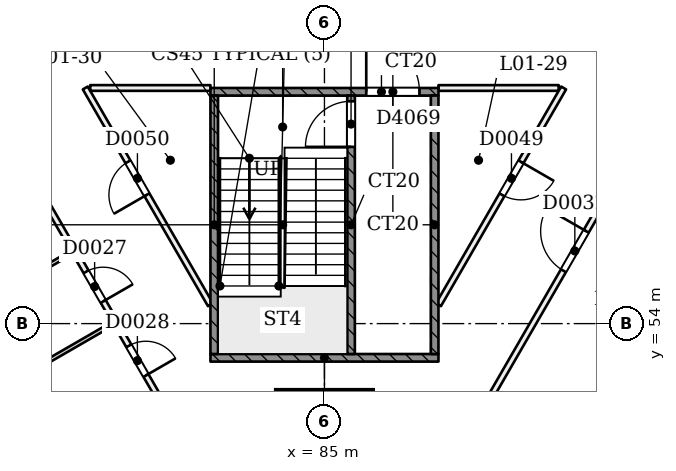
"""IFC4 building model, lengths in metres.
Left out: names, types, materials, properties, quantities, classifications, styles, units other than length and angle.
Written with IfcOpenShell. Run it as: python <this file> out.ifc"""

import sys

from ifc_helpers import new_model, si_unit, direction, frame, frame_2d, origin, origin_2d, place, context, subcontext, project, spatial, rectangle, extrude, element, fill, save


model = new_model("IFC4")
c1 = context("Model", 3, precision=1e-05, world=origin(), true_north=direction((0.0, 1.0)))
c2 = subcontext(c1, "Body", "Model", "MODEL_VIEW")
j1 = project(units=[si_unit("LENGTHUNIT", "METRE"), si_unit("PLANEANGLEUNIT", "RADIAN")], contexts=[c1])
p1 = place(None, origin())
s1 = spatial("IfcSite", under=j1, at=p1, CompositionType="ELEMENT")
p2 = place(p1, origin())
s2 = spatial("IfcBuilding", under=s1, at=p2, CompositionType="ELEMENT")
p3 = place(p2, frame((0.0, 0.0, 9.0)))
s3 = spatial("IfcBuildingStorey", under=s2, at=p3, CompositionType="ELEMENT", Elevation=9.0)
p4 = place(p3, frame((85.0, 50.908, 0.0), z_axis=(0.0, 0.058331497301, 0.998297268564), x_axis=(-1.0, 0.0, 0.0)))
e1 = element("IfcColumn", 1, at=p4, inside=s3, PredefinedType="COLUMN", context=c2, shape_type="SweptSolid", body=[
    extrude(rectangle(XDim=2.52, YDim=2.52, at=origin_2d()), origin(), (0.0, 0.0, 1.0), 4.508),
])
p5 = place(p3, frame((55.57, 95.474, 0.0), z_axis=(0.0, 0.0, 1.0), x_axis=(0.500000085768, -0.866025354266, 0.0)))
e2 = element("IfcWall", 2, at=p5, inside=s3, PredefinedType="PARTITIONING", context=c2, shape_type="SweptSolid", body=[
    extrude(rectangle(XDim=55.365, YDim=0.15, at=frame_2d((27.682, 0.0))), origin(), (0.0, 0.0, 1.0), 4.05),
])
p6 = place(p5, frame((6.832, 0.0, 0.0)))
e3 = element("IfcOpeningElement", 3, at=p6, cuts=e2, PredefinedType="OPENING", context=c2, shape_type="SweptSolid", body=[
    extrude(rectangle(XDim=1.2, YDim=2.1, at=frame_2d((0.6, 1.05))), frame((0.0, 0.085, 0.0), z_axis=(0.0, -1.0, 0.0), x_axis=(1.0, 0.0, 0.0)), (0.0, 0.0, 1.0), 0.171),
])
p7 = place(p5, frame((18.182, 0.0, 0.0)))
e4 = element("IfcOpeningElement", 4, at=p7, cuts=e2, PredefinedType="OPENING", context=c2, shape_type="SweptSolid", body=[
    extrude(rectangle(XDim=1.0, YDim=2.1, at=frame_2d((0.5, 1.05))), frame((0.0, 0.085, 0.0), z_axis=(0.0, -1.0, 0.0), x_axis=(1.0, 0.0, 0.0)), (0.0, 0.0, 1.0), 0.171),
])
p8 = place(p5, frame((30.132, 0.0, 0.0)))
e5 = element("IfcOpeningElement", 5, at=p8, cuts=e2, PredefinedType="OPENING", context=c2, shape_type="SweptSolid", body=[
    extrude(rectangle(XDim=1.2, YDim=2.1, at=frame_2d((0.6, 1.05))), frame((0.0, 0.085, 0.0), z_axis=(0.0, -1.0, 0.0), x_axis=(1.0, 0.0, 0.0)), (0.0, 0.0, 1.0), 0.171),
])
p9 = place(p5, frame((40.582, 0.0, 0.0)))
e6 = element("IfcOpeningElement", 6, at=p9, cuts=e2, PredefinedType="OPENING", context=c2, shape_type="SweptSolid", body=[
    extrude(rectangle(XDim=1.2, YDim=2.1, at=frame_2d((0.6, 1.05))), frame((0.0, 0.085, 0.0), z_axis=(0.0, -1.0, 0.0), x_axis=(1.0, 0.0, 0.0)), (0.0, 0.0, 1.0), 0.171),
])
p10 = place(p5, frame((46.315, 0.0, 0.0)))
e7 = element("IfcOpeningElement", 7, at=p10, cuts=e2, PredefinedType="OPENING", context=c2, shape_type="SweptSolid", body=[
    extrude(rectangle(XDim=0.9, YDim=2.1, at=frame_2d((0.45, 1.05))), frame((0.0, 0.085, 0.0), z_axis=(0.0, -1.0, 0.0), x_axis=(1.0, 0.0, 0.0)), (0.0, 0.0, 1.0), 0.171),
])
p11 = place(p5, frame((48.565, 0.0, 0.0)))
e8 = element("IfcOpeningElement", 8, at=p11, cuts=e2, PredefinedType="OPENING", context=c2, shape_type="SweptSolid", body=[
    extrude(rectangle(XDim=0.9, YDim=2.1, at=frame_2d((0.45, 1.05))), frame((0.0, 0.085, 0.0), z_axis=(0.0, -1.0, 0.0), x_axis=(1.0, 0.0, 0.0)), (0.0, 0.0, 1.0), 0.171),
])
p12 = place(p5, frame((53.195, 0.0, 0.0)))
e9 = element("IfcOpeningElement", 9, at=p12, cuts=e2, PredefinedType="OPENING", context=c2, shape_type="SweptSolid", body=[
    extrude(rectangle(XDim=1.2, YDim=2.1, at=frame_2d((0.6, 1.05))), frame((0.0, 0.085, 0.0), z_axis=(0.0, -1.0, 0.0), x_axis=(1.0, 0.0, 0.0)), (0.0, 0.0, 1.0), 0.171),
])
p13 = place(p3, frame((86.747, 47.526, 0.0), z_axis=(0.0, 0.0, 1.0), x_axis=(0.500000085768, 0.866025354266, 0.0)))
e10 = element("IfcWall", 10, at=p13, inside=s3, PredefinedType="PARTITIONING", context=c2, shape_type="SweptSolid", body=[
    extrude(rectangle(XDim=55.365, YDim=0.15, at=frame_2d((27.682, 0.0))), origin(), (0.0, 0.0, 1.0), 4.05),
])
p14 = place(p13, frame((0.97, 0.0, 0.0)))
e11 = element("IfcOpeningElement", 11, at=p14, cuts=e10, PredefinedType="OPENING", context=c2, shape_type="SweptSolid", body=[
    extrude(rectangle(XDim=1.2, YDim=2.1, at=frame_2d((0.6, 1.05))), frame((0.0, 0.085, 0.0), z_axis=(0.0, -1.0, 0.0), x_axis=(1.0, 0.0, 0.0)), (0.0, 0.0, 1.0), 0.171),
])
p15 = place(p13, frame((9.082, 0.0, 0.0)))
e12 = element("IfcOpeningElement", 12, at=p15, cuts=e10, PredefinedType="OPENING", context=c2, shape_type="SweptSolid", body=[
    extrude(rectangle(XDim=1.2, YDim=2.1, at=frame_2d((0.6, 1.05))), frame((0.0, 0.085, 0.0), z_axis=(0.0, -1.0, 0.0), x_axis=(1.0, 0.0, 0.0)), (0.0, 0.0, 1.0), 0.171),
])
p16 = place(p13, frame((18.082, 0.0, 0.0)))
e13 = element("IfcOpeningElement", 13, at=p16, cuts=e10, PredefinedType="OPENING", context=c2, shape_type="SweptSolid", body=[
    extrude(rectangle(XDim=1.2, YDim=2.1, at=frame_2d((0.6, 1.05))), frame((0.0, 0.085, 0.0), z_axis=(0.0, -1.0, 0.0), x_axis=(1.0, 0.0, 0.0)), (0.0, 0.0, 1.0), 0.171),
])
p17 = place(p13, frame((23.613, 0.0, 0.0)))
e14 = element("IfcOpeningElement", 14, at=p17, cuts=e10, PredefinedType="OPENING", context=c2, shape_type="SweptSolid", body=[
    extrude(rectangle(XDim=1.0, YDim=2.1, at=frame_2d((0.5, 1.05))), frame((0.0, 0.085, 0.0), z_axis=(0.0, -1.0, 0.0), x_axis=(1.0, 0.0, 0.0)), (0.0, 0.0, 1.0), 0.171),
])
p18 = place(p13, frame((26.363, 0.0, 0.0)))
e15 = element("IfcOpeningElement", 15, at=p18, cuts=e10, PredefinedType="OPENING", context=c2, shape_type="SweptSolid", body=[
    extrude(rectangle(XDim=1.0, YDim=2.1, at=frame_2d((0.5, 1.05))), frame((0.0, 0.085, 0.0), z_axis=(0.0, -1.0, 0.0), x_axis=(1.0, 0.0, 0.0)), (0.0, 0.0, 1.0), 0.171),
])
p19 = place(p13, frame((33.032, 0.0, 0.0)))
e16 = element("IfcOpeningElement", 16, at=p19, cuts=e10, PredefinedType="OPENING", context=c2, shape_type="SweptSolid", body=[
    extrude(rectangle(XDim=1.2, YDim=2.1, at=frame_2d((0.6, 1.05))), frame((0.0, 0.085, 0.0), z_axis=(0.0, -1.0, 0.0), x_axis=(1.0, 0.0, 0.0)), (0.0, 0.0, 1.0), 0.171),
])
p20 = place(p13, frame((47.337, 0.0, 0.0)))
e17 = element("IfcOpeningElement", 17, at=p20, cuts=e10, PredefinedType="OPENING", context=c2, shape_type="SweptSolid", body=[
    extrude(rectangle(XDim=1.2, YDim=2.1, at=frame_2d((0.6, 1.05))), frame((0.0, 0.085, 0.0), z_axis=(0.0, -1.0, 0.0), x_axis=(1.0, 0.0, 0.0)), (0.0, 0.0, 1.0), 0.171),
])
p21 = place(p3, frame((88.0, 60.199, 0.0), z_axis=(0.0, 0.0, 1.0), x_axis=(0.999999952341, 0.00030873725, 0.0)))
e18 = element("IfcWall", 18, at=p21, inside=s3, PredefinedType="PARTITIONING", context=c2, shape_type="SweptSolid", body=[
    extrude(rectangle(XDim=3.163, YDim=0.15, at=frame_2d((1.582, 0.0))), origin(), (0.0, 0.0, 1.0), 4.05),
])
p22 = place(p3, frame((91.293, 60.2, 0.0), z_axis=(0.0, 0.0, 1.0), x_axis=(-0.500010165703, -0.866019534533, 0.0)))
e19 = element("IfcWall", 19, at=p22, inside=s3, PredefinedType="PARTITIONING", context=c2, shape_type="SweptSolid", body=[
    extrude(rectangle(XDim=6.586, YDim=0.15, at=frame_2d((3.293, 0.0))), origin(), (0.0, 0.0, 1.0), 4.05),
])
p23 = place(p22, frame((2.245, 0.0, 0.0)))
e20 = element("IfcOpeningElement", 20, at=p23, cuts=e19, PredefinedType="OPENING", context=c2, shape_type="SweptSolid", body=[
    extrude(rectangle(XDim=1.0, YDim=2.1, at=frame_2d((0.5, 1.05))), frame((0.0, 0.085, 0.0), z_axis=(0.0, -1.0, 0.0), x_axis=(1.0, 0.0, 0.0)), (0.0, 0.0, 1.0), 0.171),
])
p24 = place(p3, frame((82.0, 54.496, 0.0), z_axis=(0.0, 0.0, 1.0), x_axis=(-0.500010165703, 0.866019534533, 0.0)))
e21 = element("IfcWall", 21, at=p24, inside=s3, PredefinedType="PARTITIONING", context=c2, shape_type="SweptSolid", body=[
    extrude(rectangle(XDim=6.586, YDim=0.15, at=frame_2d((3.293, 0.0))), origin(), (0.0, 0.0, 1.0), 4.05),
])
p25 = place(p24, frame((3.342, 0.0, 0.0)))
e22 = element("IfcOpeningElement", 22, at=p25, cuts=e21, PredefinedType="OPENING", context=c2, shape_type="SweptSolid", body=[
    extrude(rectangle(XDim=1.0, YDim=2.1, at=frame_2d((0.5, 1.05))), frame((0.0, 0.085, 0.0), z_axis=(0.0, -1.0, 0.0), x_axis=(1.0, 0.0, 0.0)), (0.0, 0.0, 1.0), 0.171),
])
p26 = place(p3, frame((78.837, 60.2, 0.0), z_axis=(0.0, 0.0, 1.0), x_axis=(0.999999952341, -0.00030873725, 0.0)))
e23 = element("IfcWall", 23, at=p26, inside=s3, PredefinedType="PARTITIONING", context=c2, shape_type="SweptSolid", body=[
    extrude(rectangle(XDim=3.163, YDim=0.15, at=frame_2d((1.582, 0.0))), origin(), (0.0, 0.0, 1.0), 4.05),
])
p27 = place(p3, frame((72.869, 52.711, 0.0), z_axis=(0.0, 0.0, 1.0), x_axis=(0.866025537322, 0.499999768706, 0.0)))
e24 = element("IfcWall", 24, at=p27, inside=s3, PredefinedType="PARTITIONING", context=c2, shape_type="SweptSolid", body=[
    extrude(rectangle(XDim=6.325, YDim=0.1, at=frame_2d((3.163, 0.0))), origin(), (0.0, 0.0, 1.0), 4.05),
])
p28 = place(p3, frame((73.952, 50.836, 0.0), z_axis=(0.0, 0.0, 1.0), x_axis=(0.866015887322, 0.500016482634, 0.0)))
e25 = element("IfcWall", 25, at=p28, inside=s3, PredefinedType="PARTITIONING", context=c2, shape_type="SweptSolid", body=[
    extrude(rectangle(XDim=6.325, YDim=0.1, at=frame_2d((3.163, 0.0))), origin(), (0.0, 0.0, 1.0), 4.05),
])
p29 = place(p3, frame((79.673, 41.126, 0.0), z_axis=(0.0, 0.0, 1.0), x_axis=(-0.499997306052, 0.866026959131, 0.0)))
e26 = element("IfcWall", 26, at=p29, inside=s3, PredefinedType="SOLIDWALL", context=c2, shape_type="SweptSolid", body=[
    extrude(rectangle(XDim=62.87, YDim=0.4, at=frame_2d((31.435, 0.0))), origin(), (0.0, 0.0, 1.0), 4.05),
])
p30 = place(p29, frame((54.986, 0.0, 0.9)))
e27 = element("IfcOpeningElement", 27, at=p30, cuts=e26, PredefinedType="OPENING", context=c2, shape_type="SweptSolid", body=[
    extrude(rectangle(XDim=2.4, YDim=1.5, at=frame_2d((1.2, 0.75))), frame((0.0, 0.21, 0.0), z_axis=(0.0, -1.0, 0.0), x_axis=(1.0, 0.0, 0.0)), (0.0, 0.0, 1.0), 0.421),
])
p31 = place(p29, frame((50.486, 0.0, 0.9)))
e28 = element("IfcOpeningElement", 28, at=p31, cuts=e26, PredefinedType="OPENING", context=c2, shape_type="SweptSolid", body=[
    extrude(rectangle(XDim=2.4, YDim=1.5, at=frame_2d((1.2, 0.75))), frame((0.0, 0.21, 0.0), z_axis=(0.0, -1.0, 0.0), x_axis=(1.0, 0.0, 0.0)), (0.0, 0.0, 1.0), 0.421),
])
p32 = place(p29, frame((45.986, 0.0, 0.9)))
e29 = element("IfcOpeningElement", 29, at=p32, cuts=e26, PredefinedType="OPENING", context=c2, shape_type="SweptSolid", body=[
    extrude(rectangle(XDim=2.4, YDim=1.5, at=frame_2d((1.2, 0.75))), frame((0.0, 0.21, 0.0), z_axis=(0.0, -1.0, 0.0), x_axis=(1.0, 0.0, 0.0)), (0.0, 0.0, 1.0), 0.421),
])
p33 = place(p29, frame((32.486, 0.0, 0.9)))
e30 = element("IfcOpeningElement", 30, at=p33, cuts=e26, PredefinedType="OPENING", context=c2, shape_type="SweptSolid", body=[
    extrude(rectangle(XDim=2.4, YDim=1.5, at=frame_2d((1.2, 0.75))), frame((0.0, 0.21, 0.0), z_axis=(0.0, -1.0, 0.0), x_axis=(1.0, 0.0, 0.0)), (0.0, 0.0, 1.0), 0.421),
])
p34 = place(p29, frame((27.986, 0.0, 0.9)))
e31 = element("IfcOpeningElement", 31, at=p34, cuts=e26, PredefinedType="OPENING", context=c2, shape_type="SweptSolid", body=[
    extrude(rectangle(XDim=2.4, YDim=1.5, at=frame_2d((1.2, 0.75))), frame((0.0, 0.21, 0.0), z_axis=(0.0, -1.0, 0.0), x_axis=(1.0, 0.0, 0.0)), (0.0, 0.0, 1.0), 0.421),
])
p35 = place(p29, frame((23.486, 0.0, 0.9)))
e32 = element("IfcOpeningElement", 32, at=p35, cuts=e26, PredefinedType="OPENING", context=c2, shape_type="SweptSolid", body=[
    extrude(rectangle(XDim=2.4, YDim=1.5, at=frame_2d((1.2, 0.75))), frame((0.0, 0.21, 0.0), z_axis=(0.0, -1.0, 0.0), x_axis=(1.0, 0.0, 0.0)), (0.0, 0.0, 1.0), 0.421),
])
p36 = place(p29, frame((18.986, 0.0, 0.9)))
e33 = element("IfcOpeningElement", 33, at=p36, cuts=e26, PredefinedType="OPENING", context=c2, shape_type="SweptSolid", body=[
    extrude(rectangle(XDim=2.4, YDim=1.5, at=frame_2d((1.2, 0.75))), frame((0.0, 0.21, 0.0), z_axis=(0.0, -1.0, 0.0), x_axis=(1.0, 0.0, 0.0)), (0.0, 0.0, 1.0), 0.421),
])
p37 = place(p29, frame((14.486, 0.0, 0.9)))
e34 = element("IfcOpeningElement", 34, at=p37, cuts=e26, PredefinedType="OPENING", context=c2, shape_type="SweptSolid", body=[
    extrude(rectangle(XDim=2.4, YDim=1.5, at=frame_2d((1.2, 0.75))), frame((0.0, 0.21, 0.0), z_axis=(0.0, -1.0, 0.0), x_axis=(1.0, 0.0, 0.0)), (0.0, 0.0, 1.0), 0.421),
])
p38 = place(p3, frame((121.762, 95.574, 0.0), z_axis=(0.0, 0.0, 1.0), x_axis=(-0.499997306052, -0.866026959131, 0.0)))
e35 = element("IfcWall", 35, at=p38, inside=s3, PredefinedType="SOLIDWALL", context=c2, shape_type="SweptSolid", body=[
    extrude(rectangle(XDim=62.87, YDim=0.4, at=frame_2d((31.435, 0.0))), origin(), (0.0, 0.0, 1.0), 4.05),
])
p39 = place(p38, frame((59.452, 0.0, 0.9)))
e36 = element("IfcOpeningElement", 36, at=p39, cuts=e35, PredefinedType="OPENING", context=c2, shape_type="SweptSolid", body=[
    extrude(rectangle(XDim=2.4, YDim=1.5, at=frame_2d((1.2, 0.75))), frame((0.0, 0.21, 0.0), z_axis=(0.0, -1.0, 0.0), x_axis=(1.0, 0.0, 0.0)), (0.0, 0.0, 1.0), 0.421),
])
p40 = place(p38, frame((54.986, 0.0, 0.9)))
e37 = element("IfcOpeningElement", 37, at=p40, cuts=e35, PredefinedType="OPENING", context=c2, shape_type="SweptSolid", body=[
    extrude(rectangle(XDim=2.4, YDim=1.5, at=frame_2d((1.2, 0.75))), frame((0.0, 0.21, 0.0), z_axis=(0.0, -1.0, 0.0), x_axis=(1.0, 0.0, 0.0)), (0.0, 0.0, 1.0), 0.421),
])
p41 = place(p38, frame((50.486, 0.0, 0.9)))
e38 = element("IfcOpeningElement", 38, at=p41, cuts=e35, PredefinedType="OPENING", context=c2, shape_type="SweptSolid", body=[
    extrude(rectangle(XDim=2.4, YDim=1.5, at=frame_2d((1.2, 0.75))), frame((0.0, 0.21, 0.0), z_axis=(0.0, -1.0, 0.0), x_axis=(1.0, 0.0, 0.0)), (0.0, 0.0, 1.0), 0.421),
])
p42 = place(p38, frame((45.986, 0.0, 0.9)))
e39 = element("IfcOpeningElement", 39, at=p42, cuts=e35, PredefinedType="OPENING", context=c2, shape_type="SweptSolid", body=[
    extrude(rectangle(XDim=2.4, YDim=1.5, at=frame_2d((1.2, 0.75))), frame((0.0, 0.21, 0.0), z_axis=(0.0, -1.0, 0.0), x_axis=(1.0, 0.0, 0.0)), (0.0, 0.0, 1.0), 0.421),
])
p43 = place(p38, frame((41.486, 0.0, 0.9)))
e40 = element("IfcOpeningElement", 40, at=p43, cuts=e35, PredefinedType="OPENING", context=c2, shape_type="SweptSolid", body=[
    extrude(rectangle(XDim=2.4, YDim=1.5, at=frame_2d((1.2, 0.75))), frame((0.0, 0.21, 0.0), z_axis=(0.0, -1.0, 0.0), x_axis=(1.0, 0.0, 0.0)), (0.0, 0.0, 1.0), 0.421),
])
p44 = place(p38, frame((36.986, 0.0, 0.9)))
e41 = element("IfcOpeningElement", 41, at=p44, cuts=e35, PredefinedType="OPENING", context=c2, shape_type="SweptSolid", body=[
    extrude(rectangle(XDim=2.4, YDim=1.5, at=frame_2d((1.2, 0.75))), frame((0.0, 0.21, 0.0), z_axis=(0.0, -1.0, 0.0), x_axis=(1.0, 0.0, 0.0)), (0.0, 0.0, 1.0), 0.421),
])
p45 = place(p38, frame((23.486, 0.0, 0.9)))
e42 = element("IfcOpeningElement", 42, at=p45, cuts=e35, PredefinedType="OPENING", context=c2, shape_type="SweptSolid", body=[
    extrude(rectangle(XDim=2.4, YDim=1.5, at=frame_2d((1.2, 0.75))), frame((0.0, 0.21, 0.0), z_axis=(0.0, -1.0, 0.0), x_axis=(1.0, 0.0, 0.0)), (0.0, 0.0, 1.0), 0.421),
])
p46 = place(p38, frame((18.986, 0.0, 0.9)))
e43 = element("IfcOpeningElement", 43, at=p46, cuts=e35, PredefinedType="OPENING", context=c2, shape_type="SweptSolid", body=[
    extrude(rectangle(XDim=2.4, YDim=1.5, at=frame_2d((1.2, 0.75))), frame((0.0, 0.21, 0.0), z_axis=(0.0, -1.0, 0.0), x_axis=(1.0, 0.0, 0.0)), (0.0, 0.0, 1.0), 0.421),
])
p47 = place(p38, frame((14.486, 0.0, 0.9)))
e44 = element("IfcOpeningElement", 44, at=p47, cuts=e35, PredefinedType="OPENING", context=c2, shape_type="SweptSolid", body=[
    extrude(rectangle(XDim=2.4, YDim=1.5, at=frame_2d((1.2, 0.75))), frame((0.0, 0.21, 0.0), z_axis=(0.0, -1.0, 0.0), x_axis=(1.0, 0.0, 0.0)), (0.0, 0.0, 1.0), 0.421),
])
p48 = place(p38, frame((5.486, 0.0, 0.9)))
e45 = element("IfcOpeningElement", 45, at=p48, cuts=e35, PredefinedType="OPENING", context=c2, shape_type="SweptSolid", body=[
    extrude(rectangle(XDim=2.4, YDim=1.5, at=frame_2d((1.2, 0.75))), frame((0.0, 0.21, 0.0), z_axis=(0.0, -1.0, 0.0), x_axis=(1.0, 0.0, 0.0)), (0.0, 0.0, 1.0), 0.421),
])
p49 = place(p38, frame((1.018, 0.0, 0.9)))
e46 = element("IfcOpeningElement", 46, at=p49, cuts=e35, PredefinedType="OPENING", context=c2, shape_type="SweptSolid", body=[
    extrude(rectangle(XDim=2.4, YDim=1.5, at=frame_2d((1.2, 0.75))), frame((0.0, 0.21, 0.0), z_axis=(0.0, -1.0, 0.0), x_axis=(1.0, 0.0, 0.0)), (0.0, 0.0, 1.0), 0.421),
])
p50 = place(p3, frame((82.0, 60.1, 0.0), z_axis=(0.0, 0.0, 1.0), x_axis=(1.0, 0.0, 0.0)))
e47 = element("IfcWall", 47, at=p50, inside=s3, PredefinedType="SOLIDWALL", context=c2, shape_type="SweptSolid", body=[
    extrude(rectangle(XDim=6.0, YDim=0.2, at=frame_2d((3.0, 0.0))), origin(), (0.0, 0.0, 1.0), 4.05),
])
p51 = place(p50, frame((4.1, 0.0, 0.0)))
e48 = element("IfcOpeningElement", 48, at=p51, cuts=e47, PredefinedType="OPENING", context=c2, shape_type="SweptSolid", body=[
    extrude(rectangle(XDim=1.4, YDim=2.1, at=frame_2d((0.7, 1.05))), frame((0.0, 0.11, 0.0), z_axis=(0.0, -1.0, 0.0), x_axis=(1.0, 0.0, 0.0)), (0.0, 0.0, 1.0), 0.221),
])
p52 = place(p3, frame((82.0, 53.1, 0.0), z_axis=(0.0, 0.0, 1.0), x_axis=(1.0, 0.0, 0.0)))
e49 = element("IfcWall", 49, at=p52, inside=s3, PredefinedType="SOLIDWALL", context=c2, shape_type="SweptSolid", body=[
    extrude(rectangle(XDim=6.0, YDim=0.2, at=frame_2d((3.0, 0.0))), origin(), (0.0, 0.0, 1.0), 4.05),
])
for number, where, z_axis, x_axis in (
    (50, (82.1, 53.2, 0.0), (0.0, 0.0, 1.0), (0.0, 1.0, 0.0)),
    (51, (87.9, 53.2, 0.0), (0.0, 0.0, 1.0), (0.0, 1.0, 0.0)),
):
    element("IfcWall", number, at=place(p3, frame(where, z_axis=z_axis, x_axis=x_axis)), inside=s3, PredefinedType="SOLIDWALL", context=c2, shape_type="SweptSolid", body=[
        extrude(rectangle(XDim=6.8, YDim=0.2, at=frame_2d((3.4, 0.0))), origin(), (0.0, 0.0, 1.0), 4.05),
    ])
p53 = place(p3, frame((85.7, 53.2, 0.0), z_axis=(0.0, 0.0, 1.0), x_axis=(0.0, 1.0, 0.0)))
e52 = element("IfcWall", 52, at=p53, inside=s3, PredefinedType="SOLIDWALL", context=c2, shape_type="SweptSolid", body=[
    extrude(rectangle(XDim=6.8, YDim=0.2, at=frame_2d((3.4, 0.0))), origin(), (0.0, 0.0, 1.0), 4.05),
])
p54 = place(p53, frame((5.45, 0.0, 0.0)))
e53 = element("IfcOpeningElement", 53, at=p54, cuts=e52, PredefinedType="OPENING", context=c2, shape_type="SweptSolid", body=[
    extrude(rectangle(XDim=1.2, YDim=2.1, at=frame_2d((0.6, 1.05))), frame((0.0, 0.11, 0.0), z_axis=(0.0, -1.0, 0.0), x_axis=(1.0, 0.0, 0.0)), (0.0, 0.0, 1.0), 0.221),
])
p55 = place(p10, origin())
e54 = element("IfcDoor", 54, at=p55, inside=s3, OperationType="SINGLE_SWING_RIGHT", PredefinedType="NOTDEFINED", context=c2, shape_type="SweptSolid", body=[
    extrude(rectangle(XDim=0.9, YDim=2.1, at=frame_2d((0.45, 1.05))), frame((0.0, 0.025, 0.0), z_axis=(0.0, -1.0, 0.0), x_axis=(1.0, 0.0, 0.0)), (0.0, 0.0, 1.0), 0.05),
])
fill(e7, e54)
p56 = place(p11, origin())
e55 = element("IfcDoor", 55, at=p56, inside=s3, OperationType="SINGLE_SWING_RIGHT", PredefinedType="NOTDEFINED", context=c2, shape_type="SweptSolid", body=[
    extrude(rectangle(XDim=0.9, YDim=2.1, at=frame_2d((0.45, 1.05))), frame((0.0, 0.025, 0.0), z_axis=(0.0, -1.0, 0.0), x_axis=(1.0, 0.0, 0.0)), (0.0, 0.0, 1.0), 0.05),
])
fill(e8, e55)
p57 = place(p15, origin())
e56 = element("IfcDoor", 56, at=p57, inside=s3, OperationType="SINGLE_SWING_RIGHT", PredefinedType="NOTDEFINED", context=c2, shape_type="SweptSolid", body=[
    extrude(rectangle(XDim=1.2, YDim=2.1, at=frame_2d((0.6, 1.05))), frame((0.0, 0.025, 0.0), z_axis=(0.0, -1.0, 0.0), x_axis=(1.0, 0.0, 0.0)), (0.0, 0.0, 1.0), 0.05),
])
fill(e12, e56)
p58 = place(p23, origin())
e57 = element("IfcDoor", 57, at=p58, inside=s3, OperationType="SINGLE_SWING_LEFT", PredefinedType="NOTDEFINED", context=c2, shape_type="SweptSolid", body=[
    extrude(rectangle(XDim=1.0, YDim=2.1, at=frame_2d((0.5, 1.05))), frame((0.0, 0.025, 0.0), z_axis=(0.0, -1.0, 0.0), x_axis=(1.0, 0.0, 0.0)), (0.0, 0.0, 1.0), 0.05),
])
fill(e20, e57)
p59 = place(p25, origin())
e58 = element("IfcDoor", 58, at=p59, inside=s3, OperationType="SINGLE_SWING_LEFT", PredefinedType="NOTDEFINED", context=c2, shape_type="SweptSolid", body=[
    extrude(rectangle(XDim=1.0, YDim=2.1, at=frame_2d((0.5, 1.05))), frame((0.0, 0.025, 0.0), z_axis=(0.0, -1.0, 0.0), x_axis=(1.0, 0.0, 0.0)), (0.0, 0.0, 1.0), 0.05),
])
fill(e22, e58)
p60 = place(p51, origin())
e59 = element("IfcDoor", 59, at=p60, inside=s3, OperationType="SINGLE_SWING_LEFT", PredefinedType="NOTDEFINED", context=c2, shape_type="SweptSolid", body=[
    extrude(rectangle(XDim=1.4, YDim=2.1, at=frame_2d((0.7, 1.05))), frame((0.0, 0.025, 0.0), z_axis=(0.0, -1.0, 0.0), x_axis=(1.0, 0.0, 0.0)), (0.0, 0.0, 1.0), 0.05),
])
fill(e48, e59)
p61 = place(p54, frame((1.2, 0.0, 0.0), z_axis=(0.0, 0.0, 1.0), x_axis=(-1.0, 0.0, 0.0)))
e60 = element("IfcDoor", 60, at=p61, inside=s3, OperationType="SINGLE_SWING_LEFT", PredefinedType="NOTDEFINED", context=c2, shape_type="SweptSolid", body=[
    extrude(rectangle(XDim=1.2, YDim=2.1, at=frame_2d((0.6, 1.05))), frame((0.0, 0.025, 0.0), z_axis=(0.0, -1.0, 0.0), x_axis=(1.0, 0.0, 0.0)), (0.0, 0.0, 1.0), 0.05),
])
fill(e53, e60)
save(model, sys.argv[1])
